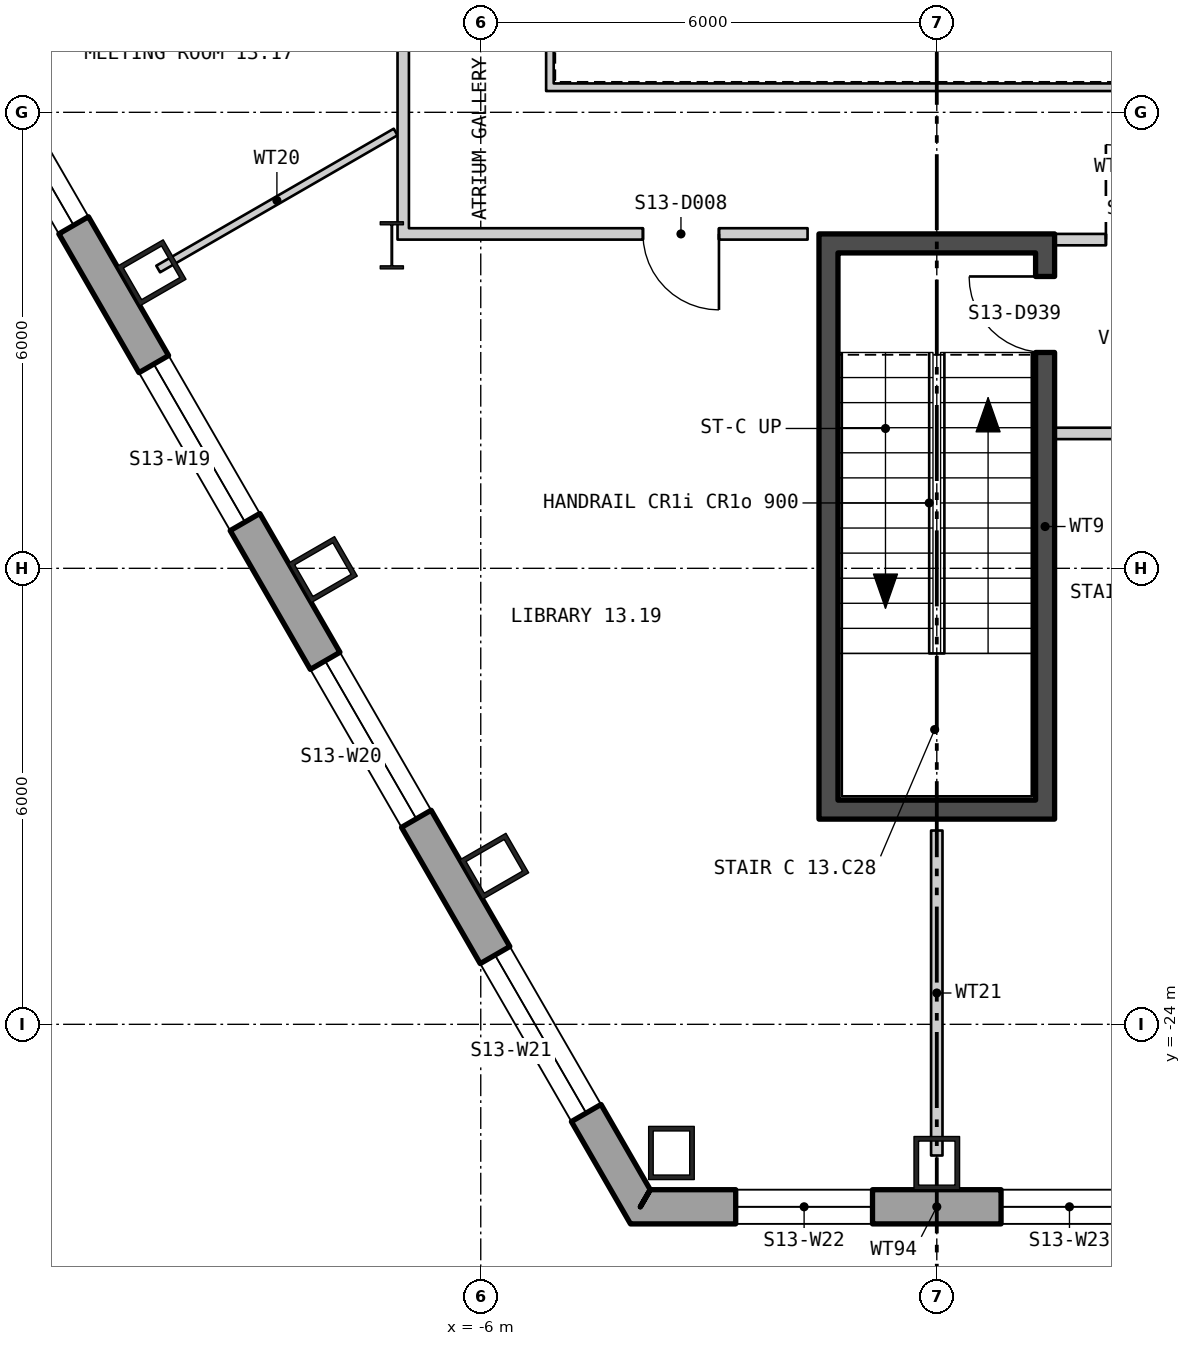
"""IFC4 building model, lengths in metres.
Left out: names, types, materials, properties, quantities, classifications, styles, units other than length and angle.
Written with IfcOpenShell. Run it as: python <this file> out.ifc"""

import sys

from ifc_helpers import new_model, si_unit, direction, frame, frame_2d, origin, origin_2d, place, context, subcontext, project, spatial, polyline, rectangle, hollow_rectangle, i_section, outline, extrude, element, fill, save


model = new_model("IFC4")
c1 = context("Model", 3, precision=1e-05, world=origin(), true_north=direction((0.0, 1.0)))
c2 = subcontext(c1, "Body", "Model", "MODEL_VIEW")
j1 = project(units=[si_unit("LENGTHUNIT", "METRE"), si_unit("PLANEANGLEUNIT", "RADIAN")], contexts=[c1])
p1 = place(None, origin())
s1 = spatial("IfcSite", under=j1, at=p1, CompositionType="ELEMENT")
p2 = place(p1, origin())
s2 = spatial("IfcBuilding", under=s1, at=p2, CompositionType="ELEMENT")
p3 = place(p2, frame((0.0, 0.0, 174.9)))
s3 = spatial("IfcBuildingStorey", under=s2, at=p3, CompositionType="ELEMENT", Elevation=174.9)
for number, where, z_axis, x_axis in (
    (1, (-10.331, -14.112, 0.0), (0.0, 0.0, 1.0), (0.5, -0.866, 0.0)),
    (2, (-8.077, -18.017, 0.0), (0.0, 0.0, 1.0), (0.5, -0.866, 0.0)),
    (3, (-5.822, -21.921, 0.0), (0.0, 0.0, 1.0), (0.5, -0.866, 0.0)),
    (4, (-3.491, -25.693, 0.0), (0.0, 0.0, 1.0), (1.0, 0.0, 0.0)),
    (5, (0.0, -25.826, 0.0), (0.0, 0.0, 1.0), (1.0, 0.0, 0.0)),
):
    element("IfcColumn", number, at=place(p3, frame(where, z_axis=z_axis, x_axis=x_axis)), inside=s3, PredefinedType="COLUMN", context=c2, shape_type="SweptSolid", body=[
        extrude(hollow_rectangle(XDim=0.6, YDim=0.7, WallThickness=0.06, at=origin_2d()), origin(), (0.0, 0.0, 1.0), 3.9),
    ])
p4 = place(p3, frame((-7.17, -13.75, 0.0), z_axis=(0.0, 0.0, 1.0), x_axis=(1.0, 0.0, 0.0)))
e6 = element("IfcColumn", 6, at=p4, inside=s3, PredefinedType="COLUMN", context=c2, shape_type="SweptSolid", body=[
    extrude(i_section(OverallWidth=0.305, OverallDepth=0.62, WebThickness=0.021, FlangeThickness=0.04, at=origin_2d()), origin(), (0.0, 0.0, 1.0), 3.9),
])
p5 = place(p3, frame((-26.775, 13.22, -0.18), z_axis=(0.0, 0.0, 1.0), x_axis=(0.500000335318, -0.866025210188, 0.0)))
e7 = element("IfcWall", 7, at=p5, inside=s3, PredefinedType="SOLIDWALL", context=c2, shape_type="SweptSolid", body=[
    extrude(outline(polyline([(-0.13, -0.225), (45.88, -0.225), (45.62, 0.225), (0.13, 0.225), (-0.13, -0.225)])), origin(), (0.0, 0.0, 1.0), 3.68),
])
p6 = place(p5, frame((1.425, 0.0, 1.08)))
e8 = element("IfcOpeningElement", 8, at=p6, cuts=e7, PredefinedType="OPENING", context=c2, shape_type="SweptSolid", body=[
    extrude(rectangle(XDim=2.4, YDim=2.0, at=frame_2d((1.2, 1.0))), frame((0.0, 0.235, 0.0), z_axis=(0.0, -1.0, 0.0), x_axis=(1.0, 0.0, 0.0)), (0.0, 0.0, 1.0), 0.47),
])
p7 = place(p5, frame((5.895, 0.0, 1.08)))
e9 = element("IfcOpeningElement", 9, at=p7, cuts=e7, PredefinedType="OPENING", context=c2, shape_type="SweptSolid", body=[
    extrude(rectangle(XDim=2.4, YDim=2.0, at=frame_2d((1.2, 1.0))), frame((0.0, 0.235, 0.0), z_axis=(0.0, -1.0, 0.0), x_axis=(1.0, 0.0, 0.0)), (0.0, 0.0, 1.0), 0.47),
])
p8 = place(p5, frame((10.403, 0.0, 1.08)))
e10 = element("IfcOpeningElement", 10, at=p8, cuts=e7, PredefinedType="OPENING", context=c2, shape_type="SweptSolid", body=[
    extrude(rectangle(XDim=2.4, YDim=2.0, at=frame_2d((1.2, 1.0))), frame((0.0, 0.235, 0.0), z_axis=(0.0, -1.0, 0.0), x_axis=(1.0, 0.0, 0.0)), (0.0, 0.0, 1.0), 0.47),
])
p9 = place(p5, frame((14.912, 0.0, 1.08)))
e11 = element("IfcOpeningElement", 11, at=p9, cuts=e7, PredefinedType="OPENING", context=c2, shape_type="SweptSolid", body=[
    extrude(rectangle(XDim=2.4, YDim=2.0, at=frame_2d((1.2, 1.0))), frame((0.0, 0.235, 0.0), z_axis=(0.0, -1.0, 0.0), x_axis=(1.0, 0.0, 0.0)), (0.0, 0.0, 1.0), 0.47),
])
p10 = place(p5, frame((19.421, 0.0, 1.08)))
e12 = element("IfcOpeningElement", 12, at=p10, cuts=e7, PredefinedType="OPENING", context=c2, shape_type="SweptSolid", body=[
    extrude(rectangle(XDim=2.4, YDim=2.0, at=frame_2d((1.2, 1.0))), frame((0.0, 0.235, 0.0), z_axis=(0.0, -1.0, 0.0), x_axis=(1.0, 0.0, 0.0)), (0.0, 0.0, 1.0), 0.47),
])
p11 = place(p5, frame((23.929, 0.0, 1.08)))
e13 = element("IfcOpeningElement", 13, at=p11, cuts=e7, PredefinedType="OPENING", context=c2, shape_type="SweptSolid", body=[
    extrude(rectangle(XDim=2.4, YDim=2.0, at=frame_2d((1.2, 1.0))), frame((0.0, 0.235, 0.0), z_axis=(0.0, -1.0, 0.0), x_axis=(1.0, 0.0, 0.0)), (0.0, 0.0, 1.0), 0.47),
])
p12 = place(p5, frame((28.438, 0.0, 1.08)))
e14 = element("IfcOpeningElement", 14, at=p12, cuts=e7, PredefinedType="OPENING", context=c2, shape_type="SweptSolid", body=[
    extrude(rectangle(XDim=2.4, YDim=2.0, at=frame_2d((1.2, 1.0))), frame((0.0, 0.235, 0.0), z_axis=(0.0, -1.0, 0.0), x_axis=(1.0, 0.0, 0.0)), (0.0, 0.0, 1.0), 0.47),
])
p13 = place(p5, frame((32.947, 0.0, 1.08)))
e15 = element("IfcOpeningElement", 15, at=p13, cuts=e7, PredefinedType="OPENING", context=c2, shape_type="SweptSolid", body=[
    extrude(rectangle(XDim=2.4, YDim=2.0, at=frame_2d((1.2, 1.0))), frame((0.0, 0.235, 0.0), z_axis=(0.0, -1.0, 0.0), x_axis=(1.0, 0.0, 0.0)), (0.0, 0.0, 1.0), 0.47),
])
p14 = place(p5, frame((37.455, 0.0, 1.08)))
e16 = element("IfcOpeningElement", 16, at=p14, cuts=e7, PredefinedType="OPENING", context=c2, shape_type="SweptSolid", body=[
    extrude(rectangle(XDim=2.4, YDim=2.0, at=frame_2d((1.2, 1.0))), frame((0.0, 0.235, 0.0), z_axis=(0.0, -1.0, 0.0), x_axis=(1.0, 0.0, 0.0)), (0.0, 0.0, 1.0), 0.47),
])
p15 = place(p5, frame((41.925, 0.0, 1.08)))
e17 = element("IfcOpeningElement", 17, at=p15, cuts=e7, PredefinedType="OPENING", context=c2, shape_type="SweptSolid", body=[
    extrude(rectangle(XDim=2.4, YDim=2.0, at=frame_2d((1.2, 1.0))), frame((0.0, 0.235, 0.0), z_axis=(0.0, -1.0, 0.0), x_axis=(1.0, 0.0, 0.0)), (0.0, 0.0, 1.0), 0.47),
])
p16 = place(p3, frame((-3.9, -26.401, -0.18), z_axis=(0.0, 0.0, 1.0), x_axis=(1.0, 0.0, 0.0)))
e18 = element("IfcWall", 18, at=p16, inside=s3, PredefinedType="SOLIDWALL", context=c2, shape_type="SweptSolid", body=[
    extrude(outline(polyline([(-0.13, -0.225), (7.93, -0.225), (7.67, 0.225), (0.13, 0.225), (-0.13, -0.225)])), origin(), (0.0, 0.0, 1.0), 3.68),
])
p17 = place(p16, frame((1.254, 0.0, 1.08)))
e19 = element("IfcOpeningElement", 19, at=p17, cuts=e18, PredefinedType="OPENING", context=c2, shape_type="SweptSolid", body=[
    extrude(rectangle(XDim=1.8, YDim=2.0, at=frame_2d((0.9, 1.0))), frame((0.0, 0.235, 0.0), z_axis=(0.0, -1.0, 0.0), x_axis=(1.0, 0.0, 0.0)), (0.0, 0.0, 1.0), 0.47),
])
p18 = place(p16, frame((4.746, 0.0, 1.08)))
e20 = element("IfcOpeningElement", 20, at=p18, cuts=e18, PredefinedType="OPENING", context=c2, shape_type="SweptSolid", body=[
    extrude(rectangle(XDim=1.8, YDim=2.0, at=frame_2d((0.9, 1.0))), frame((0.0, 0.235, 0.0), z_axis=(0.0, -1.0, 0.0), x_axis=(1.0, 0.0, 0.0)), (0.0, 0.0, 1.0), 0.47),
])
p19 = place(p3, frame((-5.14, -11.67, 0.0), z_axis=(0.0, 0.0, 1.0), x_axis=(1.0, 0.0, 0.0)))
e21 = element("IfcWall", 21, at=p19, inside=s3, PredefinedType="PARTITIONING", context=c2, shape_type="SweptSolid", body=[
    extrude(rectangle(XDim=10.28, YDim=0.1, at=frame_2d((5.14, 0.0))), origin(), (0.0, 0.0, 1.0), 3.7),
])
p20 = place(p3, frame((-5.09, -3.58, 0.0), z_axis=(0.0, 0.0, 1.0), x_axis=(0.0, -1.0, 0.0)))
e22 = element("IfcWall", 22, at=p20, inside=s3, PredefinedType="PARTITIONING", context=c2, shape_type="SweptSolid", body=[
    extrude(rectangle(XDim=8.04, YDim=0.1, at=frame_2d((4.02, 0.0))), origin(), (0.0, 0.0, 1.0), 3.7),
])
p21 = place(p3, frame((-1.425, -21.05, 0.0), z_axis=(0.0, 0.0, 1.0), x_axis=(0.0, 1.0, 0.0)))
e23 = element("IfcWall", 23, at=p21, inside=s3, PredefinedType="SHEAR", context=c2, shape_type="SweptSolid", body=[
    extrude(rectangle(XDim=7.2, YDim=0.25, at=frame_2d((3.6, 0.0))), origin(), (0.0, 0.0, 1.0), 3.7),
])
p22 = place(p3, frame((1.425, -21.05, 0.0), z_axis=(0.0, 0.0, 1.0), x_axis=(0.0, 1.0, 0.0)))
e24 = element("IfcWall", 24, at=p22, inside=s3, PredefinedType="SHEAR", context=c2, shape_type="SweptSolid", body=[
    extrude(rectangle(XDim=7.2, YDim=0.25, at=frame_2d((3.6, 0.0))), origin(), (0.0, 0.0, 1.0), 3.7),
])
p23 = place(p22, frame((5.89, 0.0, 0.0)))
e25 = element("IfcOpeningElement", 25, at=p23, cuts=e24, PredefinedType="OPENING", context=c2, shape_type="SweptSolid", body=[
    extrude(rectangle(XDim=1.0, YDim=2.1, at=frame_2d((0.5, 1.05))), frame((0.0, 0.135, 0.0), z_axis=(0.0, -1.0, 0.0), x_axis=(1.0, 0.0, 0.0)), (0.0, 0.0, 1.0), 0.27),
])
for number, where, z_axis, x_axis in (
    (26, (-1.55, -21.175, 0.0), (0.0, 0.0, 1.0), (1.0, 0.0, 0.0)),
    (27, (-1.55, -13.725, 0.0), (0.0, 0.0, 1.0), (1.0, 0.0, 0.0)),
):
    element("IfcWall", number, at=place(p3, frame(where, z_axis=z_axis, x_axis=x_axis)), inside=s3, PredefinedType="SHEAR", context=c2, shape_type="SweptSolid", body=[
        extrude(rectangle(XDim=3.1, YDim=0.25, at=frame_2d((1.55, 0.0))), origin(), (0.0, 0.0, 1.0), 3.7),
    ])
p24 = place(p3, frame((1.55, -16.225, 0.0), z_axis=(0.0, 0.0, 1.0), x_axis=(1.0, 0.0, 0.0)))
e28 = element("IfcWall", 28, at=p24, inside=s3, PredefinedType="PARTITIONING", context=c2, shape_type="SweptSolid", body=[
    extrude(rectangle(XDim=2.6, YDim=0.15, at=frame_2d((1.3, 0.0))), origin(), (0.0, 0.0, 1.0), 3.7),
])
p25 = place(p3, frame((1.55, -13.675, 0.0), z_axis=(0.0, 0.0, 1.0), x_axis=(1.0, 0.0, 0.0)))
e29 = element("IfcWall", 29, at=p25, inside=s3, PredefinedType="PARTITIONING", context=c2, shape_type="SweptSolid", body=[
    extrude(rectangle(XDim=2.6, YDim=0.15, at=frame_2d((1.3, 0.0))), origin(), (0.0, 0.0, 1.0), 2.886),
])
p26 = place(p25, frame((0.675, 0.0, 0.0)))
e30 = element("IfcOpeningElement", 30, at=p26, cuts=e29, PredefinedType="OPENING", context=c2, shape_type="SweptSolid", body=[
    extrude(rectangle(XDim=1.25, YDim=2.1, at=frame_2d((0.625, 1.05))), frame((0.0, 0.085, 0.0), z_axis=(0.0, -1.0, 0.0), x_axis=(1.0, 0.0, 0.0)), (0.0, 0.0, 1.0), 0.17),
])
p27 = place(p3, frame((-10.244, -14.062, 0.0), z_axis=(0.0, 0.0, 1.0), x_axis=(0.866102493935, 0.499866452165, 0.0)))
e31 = element("IfcWall", 31, at=p27, inside=s3, PredefinedType="PARTITIONING", context=c2, shape_type="SweptSolid", body=[
    extrude(rectangle(XDim=3.607, YDim=0.1, at=frame_2d((1.804, 0.0))), origin(), (0.0, 0.0, 1.0), 3.7),
])
p28 = place(p3, frame((-7.02, -13.675, 0.0), z_axis=(0.0, 0.0, 1.0), x_axis=(0.0, 1.0, 0.0)))
e32 = element("IfcWall", 32, at=p28, inside=s3, PredefinedType="PARTITIONING", context=c2, shape_type="SweptSolid", body=[
    extrude(rectangle(XDim=10.215, YDim=0.15, at=frame_2d((5.107, 0.0))), origin(), (0.0, 0.0, 1.0), 3.11),
])
p29 = place(p28, frame((3.577, 0.0, 0.0)))
e33 = element("IfcOpeningElement", 33, at=p29, cuts=e32, PredefinedType="OPENING", context=c2, shape_type="SweptSolid", body=[
    extrude(rectangle(XDim=1.0, YDim=2.1, at=frame_2d((0.5, 1.05))), frame((0.0, 0.085, 0.0), z_axis=(0.0, -1.0, 0.0), x_axis=(1.0, 0.0, 0.0)), (0.0, 0.0, 1.0), 0.17),
])
p30 = place(p3, frame((-6.945, -13.6, 0.0), z_axis=(0.0, 0.0, 1.0), x_axis=(1.0, 0.0, 0.0)))
e34 = element("IfcWall", 34, at=p30, inside=s3, PredefinedType="PARTITIONING", context=c2, shape_type="SweptSolid", body=[
    extrude(rectangle(XDim=5.245, YDim=0.15, at=frame_2d((2.623, 0.0))), origin(), (0.0, 0.0, 1.0), 2.886),
])
p31 = place(p30, frame((3.079, 0.0, 0.0)))
e35 = element("IfcOpeningElement", 35, at=p31, cuts=e34, PredefinedType="OPENING", context=c2, shape_type="SweptSolid", body=[
    extrude(rectangle(XDim=1.0, YDim=2.1, at=frame_2d((0.5, 1.05))), frame((0.0, 0.085, 0.0), z_axis=(0.0, -1.0, 0.0), x_axis=(1.0, 0.0, 0.0)), (0.0, 0.0, 1.0), 0.17),
])
p32 = place(p3, frame((0.0, -25.726, 0.0), z_axis=(0.0, 0.0, 1.0), x_axis=(0.0, 1.0, 0.0)))
e36 = element("IfcWall", 36, at=p32, inside=s3, PredefinedType="PARTITIONING", context=c2, shape_type="SweptSolid", body=[
    extrude(rectangle(XDim=4.276, YDim=0.15, at=frame_2d((2.138, 0.0))), origin(), (0.0, 0.0, 1.0), 3.15),
])
p33 = place(p12, origin())
e37 = element("IfcWindow", 37, at=p33, inside=s3, PartitioningType="SINGLE_PANEL", PredefinedType="WINDOW", context=c2, shape_type="SweptSolid", body=[
    extrude(rectangle(XDim=2.4, YDim=2.0, at=frame_2d((1.2, 1.0))), frame((0.0, 0.105, 0.0), z_axis=(0.0, -1.0, 0.0), x_axis=(1.0, 0.0, 0.0)), (0.0, 0.0, 1.0), 0.06),
])
fill(e14, e37)
p34 = place(p13, origin())
e38 = element("IfcWindow", 38, at=p34, inside=s3, PartitioningType="SINGLE_PANEL", PredefinedType="WINDOW", context=c2, shape_type="SweptSolid", body=[
    extrude(rectangle(XDim=2.4, YDim=2.0, at=frame_2d((1.2, 1.0))), frame((0.0, 0.105, 0.0), z_axis=(0.0, -1.0, 0.0), x_axis=(1.0, 0.0, 0.0)), (0.0, 0.0, 1.0), 0.06),
])
fill(e15, e38)
p35 = place(p14, origin())
e39 = element("IfcWindow", 39, at=p35, inside=s3, PartitioningType="SINGLE_PANEL", PredefinedType="WINDOW", context=c2, shape_type="SweptSolid", body=[
    extrude(rectangle(XDim=2.4, YDim=2.0, at=frame_2d((1.2, 1.0))), frame((0.0, 0.105, 0.0), z_axis=(0.0, -1.0, 0.0), x_axis=(1.0, 0.0, 0.0)), (0.0, 0.0, 1.0), 0.06),
])
fill(e16, e39)
p36 = place(p15, origin())
e40 = element("IfcWindow", 40, at=p36, inside=s3, PartitioningType="SINGLE_PANEL", PredefinedType="WINDOW", context=c2, shape_type="SweptSolid", body=[
    extrude(rectangle(XDim=2.4, YDim=2.0, at=frame_2d((1.2, 1.0))), frame((0.0, 0.105, 0.0), z_axis=(0.0, -1.0, 0.0), x_axis=(1.0, 0.0, 0.0)), (0.0, 0.0, 1.0), 0.06),
])
fill(e17, e40)
p37 = place(p17, origin())
e41 = element("IfcWindow", 41, at=p37, inside=s3, PartitioningType="SINGLE_PANEL", PredefinedType="WINDOW", context=c2, shape_type="SweptSolid", body=[
    extrude(rectangle(XDim=1.8, YDim=2.0, at=frame_2d((0.9, 1.0))), frame((0.0, 0.105, 0.0), z_axis=(0.0, -1.0, 0.0), x_axis=(1.0, 0.0, 0.0)), (0.0, 0.0, 1.0), 0.06),
])
fill(e19, e41)
p38 = place(p18, origin())
e42 = element("IfcWindow", 42, at=p38, inside=s3, PartitioningType="SINGLE_PANEL", PredefinedType="WINDOW", context=c2, shape_type="SweptSolid", body=[
    extrude(rectangle(XDim=1.8, YDim=2.0, at=frame_2d((0.9, 1.0))), frame((0.0, 0.105, 0.0), z_axis=(0.0, -1.0, 0.0), x_axis=(1.0, 0.0, 0.0)), (0.0, 0.0, 1.0), 0.06),
])
fill(e20, e42)
p39 = place(p23, origin())
e43 = element("IfcDoor", 43, at=p39, inside=s3, OperationType="SINGLE_SWING_LEFT", PredefinedType="DOOR", context=c2, shape_type="SweptSolid", body=[
    extrude(rectangle(XDim=1.0, YDim=2.1, at=frame_2d((0.5, 1.05))), frame((0.0, 0.025, 0.0), z_axis=(0.0, -1.0, 0.0), x_axis=(1.0, 0.0, 0.0)), (0.0, 0.0, 1.0), 0.05),
])
fill(e25, e43)
p40 = place(p26, origin())
e44 = element("IfcDoor", 44, at=p40, inside=s3, OperationType="SINGLE_SWING_RIGHT", PredefinedType="DOOR", context=c2, shape_type="SweptSolid", body=[
    extrude(rectangle(XDim=1.25, YDim=2.1, at=frame_2d((0.625, 1.05))), frame((0.0, 0.025, 0.0), z_axis=(0.0, -1.0, 0.0), x_axis=(1.0, 0.0, 0.0)), (0.0, 0.0, 1.0), 0.05),
])
fill(e30, e44)
p41 = place(p31, origin())
e45 = element("IfcDoor", 45, at=p41, inside=s3, OperationType="SINGLE_SWING_RIGHT", PredefinedType="DOOR", context=c2, shape_type="SweptSolid", body=[
    extrude(rectangle(XDim=1.0, YDim=2.1, at=frame_2d((0.5, 1.05))), frame((0.0, 0.025, 0.0), z_axis=(0.0, -1.0, 0.0), x_axis=(1.0, 0.0, 0.0)), (0.0, 0.0, 1.0), 0.05),
])
fill(e35, e45)
save(model, sys.argv[1])
